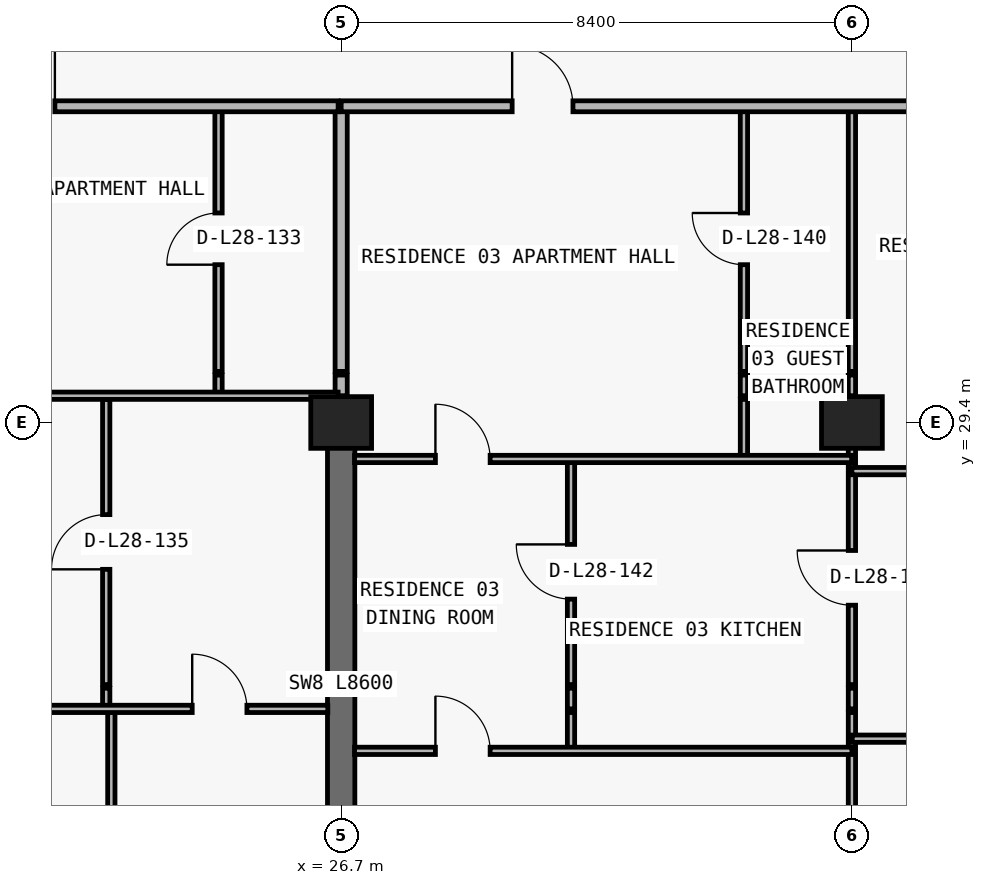
"""IFC4 building model, lengths in metres.
Left out: names, types, materials, properties, quantities, classifications, styles, units other than length and angle.
Written with IfcOpenShell. Run it as: python <this file> out.ifc"""

import sys

from ifc_helpers import new_model, si_unit, direction, frame, frame_2d, origin, origin_2d, place, context, subcontext, project, spatial, rectangle, extrude, element, fill, save


model = new_model("IFC4")
c1 = context("Model", 3, precision=1e-05, world=origin(), true_north=direction((0.0, 1.0)))
c2 = subcontext(c1, "Body", "Model", "MODEL_VIEW")
j1 = project(units=[si_unit("LENGTHUNIT", "METRE"), si_unit("PLANEANGLEUNIT", "RADIAN")], contexts=[c1])
p1 = place(None, origin())
s1 = spatial("IfcSite", under=j1, at=p1, CompositionType="ELEMENT")
p2 = place(p1, origin())
s2 = spatial("IfcBuilding", under=s1, at=p2, CompositionType="ELEMENT")
p3 = place(p2, frame((0.0, 0.0, 105.9)))
s3 = spatial("IfcBuildingStorey", under=s2, at=p3, CompositionType="ELEMENT", Elevation=105.9)
for number, where, z_axis, x_axis in (
    (1, (26.7, 29.4, 0.0), (0.0, 0.0, 1.0), (1.0, 0.0, 0.0)),
    (2, (35.1, 29.4, 0.0), (0.0, 0.0, 1.0), (1.0, 0.0, 0.0)),
):
    element("IfcColumn", number, at=place(p3, frame(where, z_axis=z_axis, x_axis=x_axis)), inside=s3, PredefinedType="COLUMN", context=c2, shape_type="SweptSolid", body=[
        extrude(rectangle(XDim=1.0, YDim=0.85, at=origin_2d()), origin(), (0.0, 0.0, 1.0), 3.05),
    ])
p4 = place(p3, frame((26.7, 20.8, 0.0), z_axis=(0.0, 0.0, 1.0), x_axis=(0.0, 1.0, 0.0)))
e3 = element("IfcWall", 3, at=p4, inside=s3, PredefinedType="SHEAR", context=c2, shape_type="SweptSolid", body=[
    extrude(rectangle(XDim=8.6, YDim=0.45, at=frame_2d((4.3, 0.0))), origin(), (0.0, 0.0, 1.0), 3.05),
])
p5 = place(p3, frame((22.836, 24.69, 0.0), z_axis=(0.0, 0.0, 1.0), x_axis=(0.0, 1.0, 0.0)))
e4 = element("IfcWall", 4, at=p5, inside=s3, PredefinedType="PARTITIONING", context=c2, shape_type="SweptSolid", body=[
    extrude(rectangle(XDim=0.34, YDim=0.12, at=frame_2d((0.17, 0.0))), origin(), (0.0, 0.0, 1.0), 3.05),
])
p6 = place(p3, frame((22.836, 25.09, 0.0), z_axis=(0.0, 0.0, 1.0), x_axis=(0.0, 1.0, 0.0)))
e5 = element("IfcWall", 5, at=p6, inside=s3, PredefinedType="PARTITIONING", context=c2, shape_type="SweptSolid", body=[
    extrude(rectangle(XDim=4.69, YDim=0.12, at=frame_2d((2.345, 0.0))), origin(), (0.0, 0.0, 1.0), 3.05),
])
p7 = place(p6, frame((1.895, 0.0, 0.0)))
e6 = element("IfcOpeningElement", 6, at=p7, cuts=e5, PredefinedType="OPENING", context=c2, shape_type="SweptSolid", body=[
    extrude(rectangle(XDim=0.9, YDim=2.15, at=frame_2d((0.45, 1.075))), frame((0.0, 0.07, 0.0), z_axis=(0.0, -1.0, 0.0), x_axis=(1.0, 0.0, 0.0)), (0.0, 0.0, 1.0), 0.14),
])
p8 = place(p3, frame((22.92, 8.84, 0.0), z_axis=(0.0, 0.0, 1.0), x_axis=(0.0, 1.0, 0.0)))
e7 = element("IfcWall", 7, at=p8, inside=s3, PredefinedType="PARTITIONING", context=c2, shape_type="SweptSolid", body=[
    extrude(rectangle(XDim=15.79, YDim=0.12, at=frame_2d((7.895, 0.0))), origin(), (0.0, 0.0, 1.0), 3.05),
])
p9 = place(p3, frame((24.683, 29.84, 0.0), z_axis=(0.0, 0.0, 1.0), x_axis=(0.0, 1.0, 0.0)))
e8 = element("IfcWall", 8, at=p9, inside=s3, PredefinedType="PARTITIONING", context=c2, shape_type="SweptSolid", body=[
    extrude(rectangle(XDim=0.34, YDim=0.12, at=frame_2d((0.17, 0.0))), origin(), (0.0, 0.0, 1.0), 3.05),
])
p10 = place(p3, frame((24.683, 30.24, 0.0), z_axis=(0.0, 0.0, 1.0), x_axis=(0.0, 1.0, 0.0)))
e9 = element("IfcWall", 9, at=p10, inside=s3, PredefinedType="PARTITIONING", context=c2, shape_type="SweptSolid", body=[
    extrude(rectangle(XDim=4.36, YDim=0.12, at=frame_2d((2.18, 0.0))), origin(), (0.0, 0.0, 1.0), 3.05),
])
p11 = place(p10, frame((1.755, 0.0, 0.0)))
e10 = element("IfcOpeningElement", 10, at=p11, cuts=e9, PredefinedType="OPENING", context=c2, shape_type="SweptSolid", body=[
    extrude(rectangle(XDim=0.85, YDim=2.1, at=frame_2d((0.425, 1.05))), frame((0.0, 0.07, 0.0), z_axis=(0.0, -1.0, 0.0), x_axis=(1.0, 0.0, 0.0)), (0.0, 0.0, 1.0), 0.14),
])
p12 = place(p3, frame((26.7, 29.405, 0.0), z_axis=(0.0, 0.0, 1.0), x_axis=(0.0, 1.0, 0.0)))
e11 = element("IfcWall", 11, at=p12, inside=s3, PredefinedType="PARTITIONING", context=c2, shape_type="SweptSolid", body=[
    extrude(rectangle(XDim=0.375, YDim=0.2, at=frame_2d((0.188, 0.0))), origin(), (0.0, 0.0, 1.0), 3.05),
])
p13 = place(p3, frame((26.7, 29.84, 0.0), z_axis=(0.0, 0.0, 1.0), x_axis=(0.0, 1.0, 0.0)))
e12 = element("IfcWall", 12, at=p13, inside=s3, PredefinedType="PARTITIONING", context=c2, shape_type="SweptSolid", body=[
    extrude(rectangle(XDim=0.34, YDim=0.2, at=frame_2d((0.17, 0.0))), origin(), (0.0, 0.0, 1.0), 2.335),
])
p14 = place(p3, frame((26.7, 30.24, 0.0), z_axis=(0.0, 0.0, 1.0), x_axis=(0.0, 1.0, 0.0)))
e13 = element("IfcWall", 13, at=p14, inside=s3, PredefinedType="PARTITIONING", context=c2, shape_type="SweptSolid", body=[
    extrude(rectangle(XDim=4.36, YDim=0.2, at=frame_2d((2.18, 0.0))), origin(), (0.0, 0.0, 1.0), 2.335),
])
p15 = place(p3, frame((30.48, 24.0, 0.0), z_axis=(0.0, 0.0, 1.0), x_axis=(0.0, 1.0, 0.0)))
e14 = element("IfcWall", 14, at=p15, inside=s3, PredefinedType="PARTITIONING", context=c2, shape_type="SweptSolid", body=[
    extrude(rectangle(XDim=0.63, YDim=0.12, at=frame_2d((0.315, 0.0))), origin(), (0.0, 0.0, 1.0), 3.05),
])
p16 = place(p3, frame((30.48, 24.69, 0.0), z_axis=(0.0, 0.0, 1.0), x_axis=(0.0, 1.0, 0.0)))
e15 = element("IfcWall", 15, at=p16, inside=s3, PredefinedType="PARTITIONING", context=c2, shape_type="SweptSolid", body=[
    extrude(rectangle(XDim=0.34, YDim=0.12, at=frame_2d((0.17, 0.0))), origin(), (0.0, 0.0, 1.0), 3.05),
])
p17 = place(p3, frame((30.48, 25.09, 0.0), z_axis=(0.0, 0.0, 1.0), x_axis=(0.0, 1.0, 0.0)))
e16 = element("IfcWall", 16, at=p17, inside=s3, PredefinedType="PARTITIONING", context=c2, shape_type="SweptSolid", body=[
    extrude(rectangle(XDim=3.71, YDim=0.12, at=frame_2d((1.855, 0.0))), origin(), (0.0, 0.0, 1.0), 3.05),
])
p18 = place(p17, frame((1.405, 0.0, 0.0)))
e17 = element("IfcOpeningElement", 17, at=p18, cuts=e16, PredefinedType="OPENING", context=c2, shape_type="SweptSolid", body=[
    extrude(rectangle(XDim=0.9, YDim=2.15, at=frame_2d((0.45, 1.075))), frame((0.0, 0.07, 0.0), z_axis=(0.0, -1.0, 0.0), x_axis=(1.0, 0.0, 0.0)), (0.0, 0.0, 1.0), 0.14),
])
p19 = place(p3, frame((33.324, 28.8, 0.0), z_axis=(0.0, 0.0, 1.0), x_axis=(0.0, 1.0, 0.0)))
e18 = element("IfcWall", 18, at=p19, inside=s3, PredefinedType="PARTITIONING", context=c2, shape_type="SweptSolid", body=[
    extrude(rectangle(XDim=0.98, YDim=0.12, at=frame_2d((0.49, 0.0))), origin(), (0.0, 0.0, 1.0), 3.05),
])
p20 = place(p3, frame((33.324, 29.84, 0.0), z_axis=(0.0, 0.0, 1.0), x_axis=(0.0, 1.0, 0.0)))
e19 = element("IfcWall", 19, at=p20, inside=s3, PredefinedType="PARTITIONING", context=c2, shape_type="SweptSolid", body=[
    extrude(rectangle(XDim=0.34, YDim=0.12, at=frame_2d((0.17, 0.0))), origin(), (0.0, 0.0, 1.0), 3.05),
])
p21 = place(p3, frame((33.324, 30.24, 0.0), z_axis=(0.0, 0.0, 1.0), x_axis=(0.0, 1.0, 0.0)))
e20 = element("IfcWall", 20, at=p21, inside=s3, PredefinedType="PARTITIONING", context=c2, shape_type="SweptSolid", body=[
    extrude(rectangle(XDim=4.36, YDim=0.12, at=frame_2d((2.18, 0.0))), origin(), (0.0, 0.0, 1.0), 3.05),
])
p22 = place(p21, frame((1.755, 0.0, 0.0)))
e21 = element("IfcOpeningElement", 21, at=p22, cuts=e20, PredefinedType="OPENING", context=c2, shape_type="SweptSolid", body=[
    extrude(rectangle(XDim=0.85, YDim=2.1, at=frame_2d((0.425, 1.05))), frame((0.0, 0.07, 0.0), z_axis=(0.0, -1.0, 0.0), x_axis=(1.0, 0.0, 0.0)), (0.0, 0.0, 1.0), 0.14),
])
p23 = place(p3, frame((35.1, 8.84, 0.0), z_axis=(0.0, 0.0, 1.0), x_axis=(0.0, 1.0, 0.0)))
e22 = element("IfcWall", 22, at=p23, inside=s3, PredefinedType="PARTITIONING", context=c2, shape_type="SweptSolid", body=[
    extrude(rectangle(XDim=15.79, YDim=0.12, at=frame_2d((7.895, 0.0))), origin(), (0.0, 0.0, 1.0), 2.174),
])
p24 = place(p3, frame((35.1, 24.69, 0.0), z_axis=(0.0, 0.0, 1.0), x_axis=(0.0, 1.0, 0.0)))
e23 = element("IfcWall", 23, at=p24, inside=s3, PredefinedType="PARTITIONING", context=c2, shape_type="SweptSolid", body=[
    extrude(rectangle(XDim=0.34, YDim=0.12, at=frame_2d((0.17, 0.0))), origin(), (0.0, 0.0, 1.0), 2.174),
])
p25 = place(p3, frame((35.1, 25.09, 0.0), z_axis=(0.0, 0.0, 1.0), x_axis=(0.0, 1.0, 0.0)))
e24 = element("IfcWall", 24, at=p25, inside=s3, PredefinedType="PARTITIONING", context=c2, shape_type="SweptSolid", body=[
    extrude(rectangle(XDim=4.69, YDim=0.12, at=frame_2d((2.345, 0.0))), origin(), (0.0, 0.0, 1.0), 2.174),
])
p26 = place(p25, frame((1.305, 0.0, 0.0)))
e25 = element("IfcOpeningElement", 25, at=p26, cuts=e24, PredefinedType="OPENING", context=c2, shape_type="SweptSolid", body=[
    extrude(rectangle(XDim=0.9, YDim=2.124, at=frame_2d((0.45, 1.062))), frame((0.0, 0.07, 0.0), z_axis=(0.0, -1.0, 0.0), x_axis=(1.0, 0.0, 0.0)), (0.0, 0.0, 1.0), 0.14),
])
p27 = place(p3, frame((35.1, 29.84, 0.0), z_axis=(0.0, 0.0, 1.0), x_axis=(0.0, 1.0, 0.0)))
e26 = element("IfcWall", 26, at=p27, inside=s3, PredefinedType="PARTITIONING", context=c2, shape_type="SweptSolid", body=[
    extrude(rectangle(XDim=0.34, YDim=0.12, at=frame_2d((0.17, 0.0))), origin(), (0.0, 0.0, 1.0), 2.174),
])
p28 = place(p3, frame((35.1, 30.24, 0.0), z_axis=(0.0, 0.0, 1.0), x_axis=(0.0, 1.0, 0.0)))
e27 = element("IfcWall", 27, at=p28, inside=s3, PredefinedType="PARTITIONING", context=c2, shape_type="SweptSolid", body=[
    extrude(rectangle(XDim=4.36, YDim=0.12, at=frame_2d((2.18, 0.0))), origin(), (0.0, 0.0, 1.0), 2.174),
])
p29 = place(p3, frame((26.92, 24.0, 0.0), z_axis=(0.0, 0.0, 1.0), x_axis=(1.0, 0.0, 0.0)))
e28 = element("IfcWall", 28, at=p29, inside=s3, PredefinedType="PARTITIONING", context=c2, shape_type="SweptSolid", body=[
    extrude(rectangle(XDim=8.18, YDim=0.12, at=frame_2d((4.09, 0.0))), origin(), (0.0, 0.0, 1.0), 3.05),
])
p30 = place(p29, frame((1.33, 0.0, 0.0)))
e29 = element("IfcOpeningElement", 29, at=p30, cuts=e28, PredefinedType="OPENING", context=c2, shape_type="SweptSolid", body=[
    extrude(rectangle(XDim=0.9, YDim=2.15, at=frame_2d((0.45, 1.075))), frame((0.0, 0.07, 0.0), z_axis=(0.0, -1.0, 0.0), x_axis=(1.0, 0.0, 0.0)), (0.0, 0.0, 1.0), 0.14),
])
p31 = place(p3, frame((35.105, 24.2, 0.0), z_axis=(0.0, 0.0, 1.0), x_axis=(1.0, 0.0, 0.0)))
e30 = element("IfcWall", 30, at=p31, inside=s3, PredefinedType="PARTITIONING", context=c2, shape_type="SweptSolid", body=[
    extrude(rectangle(XDim=7.59, YDim=0.12, at=frame_2d((3.795, 0.0))), origin(), (0.0, 0.0, 1.0), 3.05),
])
p32 = place(p31, frame((3.345, 0.0, 0.0)))
e31 = element("IfcOpeningElement", 31, at=p32, cuts=e30, PredefinedType="OPENING", context=c2, shape_type="SweptSolid", body=[
    extrude(rectangle(XDim=0.9, YDim=2.15, at=frame_2d((0.45, 1.075))), frame((0.0, 0.07, 0.0), z_axis=(0.0, -1.0, 0.0), x_axis=(1.0, 0.0, 0.0)), (0.0, 0.0, 1.0), 0.14),
])
p33 = place(p3, frame((18.3, 24.69, 0.0), z_axis=(0.0, 0.0, 1.0), x_axis=(1.0, 0.0, 0.0)))
e32 = element("IfcWall", 32, at=p33, inside=s3, PredefinedType="PARTITIONING", context=c2, shape_type="SweptSolid", body=[
    extrude(rectangle(XDim=8.18, YDim=0.12, at=frame_2d((4.09, 0.0))), origin(), (0.0, 0.0, 1.0), 3.05),
])
p34 = place(p33, frame((1.818, 0.0, 0.0)))
e33 = element("IfcOpeningElement", 33, at=p34, cuts=e32, PredefinedType="OPENING", context=c2, shape_type="SweptSolid", body=[
    extrude(rectangle(XDim=0.9, YDim=2.15, at=frame_2d((0.45, 1.075))), frame((0.0, 0.07, 0.0), z_axis=(0.0, -1.0, 0.0), x_axis=(1.0, 0.0, 0.0)), (0.0, 0.0, 1.0), 0.14),
])
p35 = place(p33, frame((5.95, 0.0, 0.0)))
e34 = element("IfcOpeningElement", 34, at=p35, cuts=e32, PredefinedType="OPENING", context=c2, shape_type="SweptSolid", body=[
    extrude(rectangle(XDim=0.9, YDim=2.15, at=frame_2d((0.45, 1.075))), frame((0.0, 0.07, 0.0), z_axis=(0.0, -1.0, 0.0), x_axis=(1.0, 0.0, 0.0)), (0.0, 0.0, 1.0), 0.14),
])
p36 = place(p3, frame((35.1, 28.6, 0.0), z_axis=(0.0, 0.0, 1.0), x_axis=(1.0, 0.0, 0.0)))
e35 = element("IfcWall", 35, at=p36, inside=s3, PredefinedType="PARTITIONING", context=c2, shape_type="SweptSolid", body=[
    extrude(rectangle(XDim=7.6, YDim=0.12, at=frame_2d((3.8, 0.0))), origin(), (0.0, 0.0, 1.0), 3.05),
])
p37 = place(p36, frame((2.55, 0.0, 0.0)))
e36 = element("IfcOpeningElement", 36, at=p37, cuts=e35, PredefinedType="OPENING", context=c2, shape_type="SweptSolid", body=[
    extrude(rectangle(XDim=0.9, YDim=2.15, at=frame_2d((0.45, 1.075))), frame((0.0, 0.07, 0.0), z_axis=(0.0, -1.0, 0.0), x_axis=(1.0, 0.0, 0.0)), (0.0, 0.0, 1.0), 0.14),
])
p38 = place(p3, frame((26.92, 28.8, 0.0), z_axis=(0.0, 0.0, 1.0), x_axis=(1.0, 0.0, 0.0)))
e37 = element("IfcWall", 37, at=p38, inside=s3, PredefinedType="PARTITIONING", context=c2, shape_type="SweptSolid", body=[
    extrude(rectangle(XDim=8.175, YDim=0.12, at=frame_2d((4.087, 0.0))), origin(), (0.0, 0.0, 1.0), 3.05),
])
p39 = place(p38, frame((1.33, 0.0, 0.0)))
e38 = element("IfcOpeningElement", 38, at=p39, cuts=e37, PredefinedType="OPENING", context=c2, shape_type="SweptSolid", body=[
    extrude(rectangle(XDim=0.9, YDim=2.15, at=frame_2d((0.45, 1.075))), frame((0.0, 0.07, 0.0), z_axis=(0.0, -1.0, 0.0), x_axis=(1.0, 0.0, 0.0)), (0.0, 0.0, 1.0), 0.14),
])
p40 = place(p3, frame((18.3, 29.84, 0.0), z_axis=(0.0, 0.0, 1.0), x_axis=(1.0, 0.0, 0.0)))
e39 = element("IfcWall", 39, at=p40, inside=s3, PredefinedType="PARTITIONING", context=c2, shape_type="SweptSolid", body=[
    extrude(rectangle(XDim=8.35, YDim=0.12, at=frame_2d((4.175, 0.0))), origin(), (0.0, 0.0, 1.0), 3.05),
])
p41 = place(p40, frame((1.818, 0.0, 0.0)))
e40 = element("IfcOpeningElement", 40, at=p41, cuts=e39, PredefinedType="OPENING", context=c2, shape_type="SweptSolid", body=[
    extrude(rectangle(XDim=0.9, YDim=2.15, at=frame_2d((0.45, 1.075))), frame((0.0, 0.07, 0.0), z_axis=(0.0, -1.0, 0.0), x_axis=(1.0, 0.0, 0.0)), (0.0, 0.0, 1.0), 0.14),
])
p42 = place(p3, frame((18.3, 34.6, 0.0), z_axis=(0.0, 0.0, 1.0), x_axis=(1.0, 0.0, 0.0)))
e41 = element("IfcWall", 41, at=p42, inside=s3, PredefinedType="PARTITIONING", context=c2, shape_type="SweptSolid", body=[
    extrude(rectangle(XDim=8.35, YDim=0.18, at=frame_2d((4.175, 0.0))), origin(), (0.0, 0.0, 1.0), 3.05),
])
p43 = place(p42, frame((2.691, 0.0, 0.0)))
e42 = element("IfcOpeningElement", 42, at=p43, cuts=e41, PredefinedType="OPENING", context=c2, shape_type="SweptSolid", body=[
    extrude(rectangle(XDim=1.0, YDim=2.2, at=frame_2d((0.5, 1.1))), frame((0.0, 0.1, 0.0), z_axis=(0.0, -1.0, 0.0), x_axis=(1.0, 0.0, 0.0)), (0.0, 0.0, 1.0), 0.2),
])
p44 = place(p3, frame((26.7, 34.6, 0.0), z_axis=(0.0, 0.0, 1.0), x_axis=(1.0, 0.0, 0.0)))
e43 = element("IfcWall", 43, at=p44, inside=s3, PredefinedType="PARTITIONING", context=c2, shape_type="SweptSolid", body=[
    extrude(rectangle(XDim=32.8, YDim=0.18, at=frame_2d((16.4, 0.0))), origin(), (0.0, 0.0, 1.0), 3.05),
])
p45 = place(p44, frame((2.812, 0.0, 0.0)))
e44 = element("IfcOpeningElement", 44, at=p45, cuts=e43, PredefinedType="OPENING", context=c2, shape_type="SweptSolid", body=[
    extrude(rectangle(XDim=1.0, YDim=2.2, at=frame_2d((0.5, 1.1))), frame((0.0, 0.1, 0.0), z_axis=(0.0, -1.0, 0.0), x_axis=(1.0, 0.0, 0.0)), (0.0, 0.0, 1.0), 0.2),
])
p46 = place(p44, frame((27.104, 0.0, 0.0)))
e45 = element("IfcOpeningElement", 45, at=p46, cuts=e43, PredefinedType="OPENING", context=c2, shape_type="SweptSolid", body=[
    extrude(rectangle(XDim=1.0, YDim=2.2, at=frame_2d((0.5, 1.1))), frame((0.0, 0.1, 0.0), z_axis=(0.0, -1.0, 0.0), x_axis=(1.0, 0.0, 0.0)), (0.0, 0.0, 1.0), 0.2),
])
p47 = place(p43, origin())
e46 = element("IfcDoor", 46, at=p47, inside=s3, OperationType="SINGLE_SWING_RIGHT", PredefinedType="DOOR", context=c2, shape_type="SweptSolid", body=[
    extrude(rectangle(XDim=1.0, YDim=2.2, at=frame_2d((0.5, 1.1))), frame((0.0, 0.025, 0.0), z_axis=(0.0, -1.0, 0.0), x_axis=(1.0, 0.0, 0.0)), (0.0, 0.0, 1.0), 0.05),
])
fill(e42, e46)
p48 = place(p11, origin())
e47 = element("IfcDoor", 47, at=p48, inside=s3, OperationType="SINGLE_SWING_LEFT", PredefinedType="DOOR", context=c2, shape_type="SweptSolid", body=[
    extrude(rectangle(XDim=0.85, YDim=2.1, at=frame_2d((0.425, 1.05))), frame((0.0, 0.025, 0.0), z_axis=(0.0, -1.0, 0.0), x_axis=(1.0, 0.0, 0.0)), (0.0, 0.0, 1.0), 0.05),
])
fill(e10, e47)
p49 = place(p7, origin())
e48 = element("IfcDoor", 48, at=p49, inside=s3, OperationType="SINGLE_SWING_LEFT", PredefinedType="DOOR", context=c2, shape_type="SweptSolid", body=[
    extrude(rectangle(XDim=0.9, YDim=2.15, at=frame_2d((0.45, 1.075))), frame((0.0, 0.025, 0.0), z_axis=(0.0, -1.0, 0.0), x_axis=(1.0, 0.0, 0.0)), (0.0, 0.0, 1.0), 0.05),
])
fill(e6, e48)
p50 = place(p35, origin())
e49 = element("IfcDoor", 49, at=p50, inside=s3, OperationType="SINGLE_SWING_LEFT", PredefinedType="DOOR", context=c2, shape_type="SweptSolid", body=[
    extrude(rectangle(XDim=0.9, YDim=2.15, at=frame_2d((0.45, 1.075))), frame((0.0, 0.025, 0.0), z_axis=(0.0, -1.0, 0.0), x_axis=(1.0, 0.0, 0.0)), (0.0, 0.0, 1.0), 0.05),
])
fill(e34, e49)
p51 = place(p45, origin())
e50 = element("IfcDoor", 50, at=p51, inside=s3, OperationType="SINGLE_SWING_LEFT", PredefinedType="DOOR", context=c2, shape_type="SweptSolid", body=[
    extrude(rectangle(XDim=1.0, YDim=2.2, at=frame_2d((0.5, 1.1))), frame((0.0, 0.025, 0.0), z_axis=(0.0, -1.0, 0.0), x_axis=(1.0, 0.0, 0.0)), (0.0, 0.0, 1.0), 0.05),
])
fill(e44, e50)
p52 = place(p22, origin())
e51 = element("IfcDoor", 51, at=p52, inside=s3, OperationType="SINGLE_SWING_RIGHT", PredefinedType="DOOR", context=c2, shape_type="SweptSolid", body=[
    extrude(rectangle(XDim=0.85, YDim=2.1, at=frame_2d((0.425, 1.05))), frame((0.0, 0.025, 0.0), z_axis=(0.0, -1.0, 0.0), x_axis=(1.0, 0.0, 0.0)), (0.0, 0.0, 1.0), 0.05),
])
fill(e21, e51)
p53 = place(p39, origin())
e52 = element("IfcDoor", 52, at=p53, inside=s3, OperationType="SINGLE_SWING_LEFT", PredefinedType="DOOR", context=c2, shape_type="SweptSolid", body=[
    extrude(rectangle(XDim=0.9, YDim=2.15, at=frame_2d((0.45, 1.075))), frame((0.0, 0.025, 0.0), z_axis=(0.0, -1.0, 0.0), x_axis=(1.0, 0.0, 0.0)), (0.0, 0.0, 1.0), 0.05),
])
fill(e38, e52)
p54 = place(p18, origin())
e53 = element("IfcDoor", 53, at=p54, inside=s3, OperationType="SINGLE_SWING_RIGHT", PredefinedType="DOOR", context=c2, shape_type="SweptSolid", body=[
    extrude(rectangle(XDim=0.9, YDim=2.15, at=frame_2d((0.45, 1.075))), frame((0.0, 0.025, 0.0), z_axis=(0.0, -1.0, 0.0), x_axis=(1.0, 0.0, 0.0)), (0.0, 0.0, 1.0), 0.05),
])
fill(e17, e53)
p55 = place(p30, origin())
e54 = element("IfcDoor", 54, at=p55, inside=s3, OperationType="SINGLE_SWING_LEFT", PredefinedType="DOOR", context=c2, shape_type="SweptSolid", body=[
    extrude(rectangle(XDim=0.9, YDim=2.15, at=frame_2d((0.45, 1.075))), frame((0.0, 0.025, 0.0), z_axis=(0.0, -1.0, 0.0), x_axis=(1.0, 0.0, 0.0)), (0.0, 0.0, 1.0), 0.05),
])
fill(e29, e54)
p56 = place(p26, origin())
e55 = element("IfcDoor", 55, at=p56, inside=s3, OperationType="SINGLE_SWING_RIGHT", PredefinedType="DOOR", context=c2, shape_type="SweptSolid", body=[
    extrude(rectangle(XDim=0.9, YDim=2.124, at=frame_2d((0.45, 1.062))), frame((0.0, 0.025, 0.0), z_axis=(0.0, -1.0, 0.0), x_axis=(1.0, 0.0, 0.0)), (0.0, 0.0, 1.0), 0.05),
])
fill(e25, e55)
save(model, sys.argv[1])
